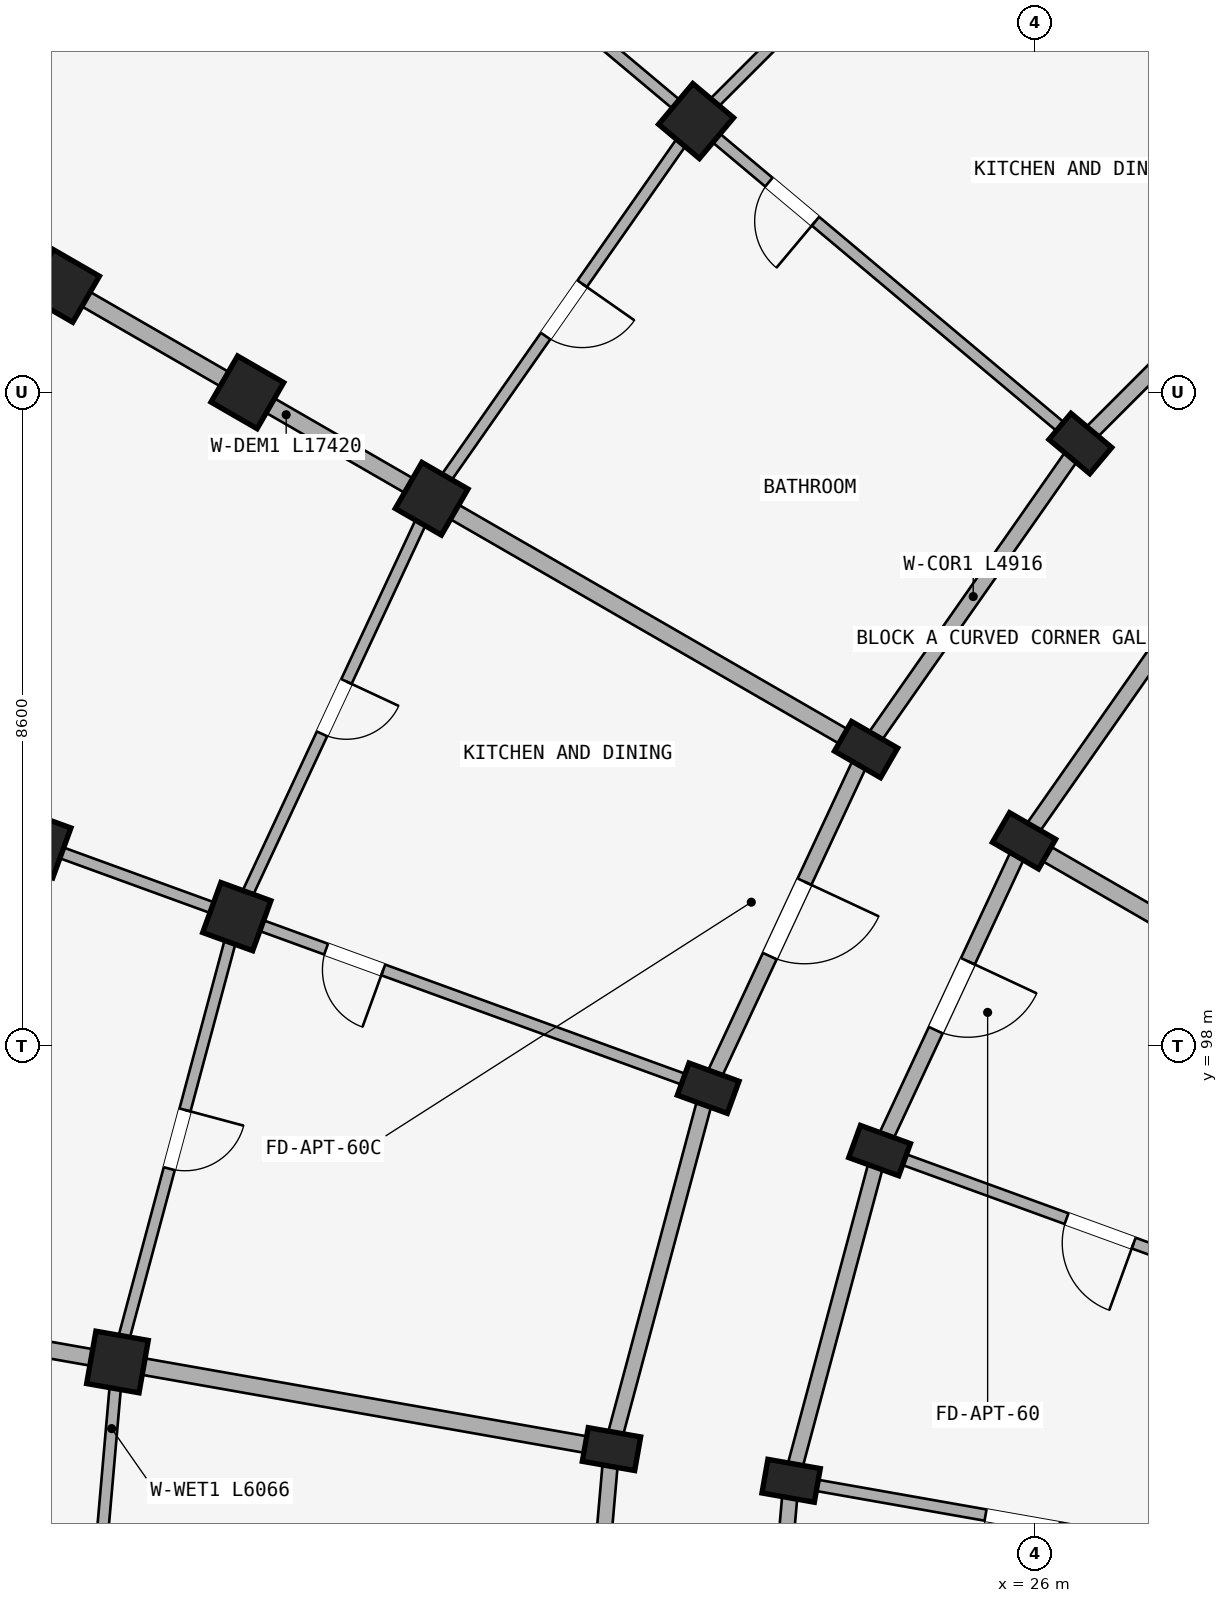
"""IFC4 building model, lengths in metres.
Left out: names, types, materials, properties, quantities, classifications, styles, units other than length and angle.
Written with IfcOpenShell. Run it as: python <this file> out.ifc"""

import sys

from ifc_helpers import new_model, si_unit, direction, frame, frame_2d, origin, origin_2d, place, context, subcontext, project, spatial, rectangle, extrude, element, fill, save


model = new_model("IFC4")
c1 = context("Model", 3, precision=1e-05, world=origin(), true_north=direction((0.0, 1.0)))
c2 = subcontext(c1, "Body", "Model", "MODEL_VIEW")
j1 = project(units=[si_unit("LENGTHUNIT", "METRE"), si_unit("PLANEANGLEUNIT", "RADIAN")], contexts=[c1])
p1 = place(None, origin())
s1 = spatial("IfcSite", under=j1, at=p1, CompositionType="ELEMENT")
p2 = place(p1, origin())
s2 = spatial("IfcBuilding", under=s1, at=p2, CompositionType="ELEMENT")
p3 = place(p2, frame((0.0, 0.0, 18.15)))
s3 = spatial("IfcBuildingStorey", under=s2, at=p3, CompositionType="ELEMENT", Elevation=18.15)
p4 = place(p3, frame((26.598, 105.927, 0.0), z_axis=(0.0, 0.0, 1.0), x_axis=(0.642787609687, 0.766044443119, 0.0)))
e1 = element("IfcColumn", 1, at=p4, inside=s3, PredefinedType="COLUMN", context=c2, shape_type="SweptSolid", body=[
    extrude(rectangle(XDim=0.45, YDim=0.7, at=origin_2d()), origin(), (0.0, 0.0, 1.0), 2.93),
])
p5 = place(p3, frame((21.542, 110.169, 0.0), z_axis=(0.0, 0.0, 1.0), x_axis=(0.642787609687, 0.766044443119, 0.0)))
e2 = element("IfcColumn", 2, at=p5, inside=s3, PredefinedType="COLUMN", context=c2, shape_type="SweptSolid", body=[
    extrude(rectangle(XDim=0.7, YDim=0.7, at=origin_2d()), origin(), (0.0, 0.0, 1.0), 2.93),
])
for number, where, z_axis, x_axis in (
    (3, (25.856, 100.7, 0.0), (0.0, 0.0, 1.0), (0.5, 0.866, 0.0)),
    (4, (23.778, 101.9, 0.0), (0.0, 0.0, 1.0), (0.5, 0.866, 0.0)),
):
    element("IfcColumn", number, at=place(p3, frame(where, z_axis=z_axis, x_axis=x_axis)), inside=s3, PredefinedType="COLUMN", context=c2, shape_type="SweptSolid", body=[
        extrude(rectangle(XDim=0.45, YDim=0.7, at=origin_2d()), origin(), (0.0, 0.0, 1.0), 2.93),
    ])
for number, where, z_axis, x_axis in (
    (5, (18.062, 105.2, 0.0), (0.0, 0.0, 1.0), (0.5, 0.866, 0.0)),
    (6, (15.637, 106.6, 0.0), (0.0, 0.0, 1.0), (0.5, 0.866, 0.0)),
    (7, (13.213, 108.0, 0.0), (0.0, 0.0, 1.0), (0.5, 0.866, 0.0)),
):
    element("IfcColumn", number, at=place(p3, frame(where, z_axis=z_axis, x_axis=x_axis)), inside=s3, PredefinedType="COLUMN", context=c2, shape_type="SweptSolid", body=[
        extrude(rectangle(XDim=0.7, YDim=0.7, at=origin_2d()), origin(), (0.0, 0.0, 1.0), 2.93),
    ])
for number, where, z_axis, x_axis in (
    (8, (23.956, 96.624, 0.0), (0.0, 0.0, 1.0), (0.342, 0.94, 0.0)),
    (9, (21.701, 97.445, 0.0), (0.0, 0.0, 1.0), (0.342, 0.94, 0.0)),
):
    element("IfcColumn", number, at=place(p3, frame(where, z_axis=z_axis, x_axis=x_axis)), inside=s3, PredefinedType="COLUMN", context=c2, shape_type="SweptSolid", body=[
        extrude(rectangle(XDim=0.45, YDim=0.7, at=origin_2d()), origin(), (0.0, 0.0, 1.0), 2.93),
    ])
for number, where, z_axis, x_axis in (
    (10, (15.499, 99.702, 0.0), (0.0, 0.0, 1.0), (0.342, 0.94, 0.0)),
    (11, (12.868, 100.66, 0.0), (0.0, 0.0, 1.0), (0.342, 0.94, 0.0)),
):
    element("IfcColumn", number, at=place(p3, frame(where, z_axis=z_axis, x_axis=x_axis)), inside=s3, PredefinedType="COLUMN", context=c2, shape_type="SweptSolid", body=[
        extrude(rectangle(XDim=0.7, YDim=0.7, at=origin_2d()), origin(), (0.0, 0.0, 1.0), 2.93),
    ])
for number, where, z_axis, x_axis in (
    (12, (22.792, 92.28, 0.0), (0.0, 0.0, 1.0), (0.174, 0.985, 0.0)),
    (13, (20.428, 92.697, 0.0), (0.0, 0.0, 1.0), (0.174, 0.985, 0.0)),
):
    element("IfcColumn", number, at=place(p3, frame(where, z_axis=z_axis, x_axis=x_axis)), inside=s3, PredefinedType="COLUMN", context=c2, shape_type="SweptSolid", body=[
        extrude(rectangle(XDim=0.45, YDim=0.7, at=origin_2d()), origin(), (0.0, 0.0, 1.0), 2.93),
    ])
p6 = place(p3, frame((13.929, 93.843, 0.0), z_axis=(0.0, 0.0, 1.0), x_axis=(0.173648177667, 0.984807753012, 0.0)))
e14 = element("IfcColumn", 14, at=p6, inside=s3, PredefinedType="COLUMN", context=c2, shape_type="SweptSolid", body=[
    extrude(rectangle(XDim=0.7, YDim=0.7, at=origin_2d()), origin(), (0.0, 0.0, 1.0), 2.93),
])
p7 = place(p3, frame((30.073, 109.402, 0.0), z_axis=(0.0, 0.0, 1.0), x_axis=(-0.707106781187, -0.707106781187, 0.0)))
e15 = element("IfcWall", 15, at=p7, inside=s3, PredefinedType="STANDARD", context=c2, shape_type="SweptSolid", body=[
    extrude(rectangle(XDim=4.916, YDim=0.2, at=frame_2d((2.458, 0.0))), origin(), (0.0, 0.0, 1.0), 2.372),
])
p8 = place(p3, frame((28.436, 104.384, 0.0), z_axis=(0.0, 0.0, 1.0), x_axis=(-0.573571637217, -0.819155404658, 0.0)))
e16 = element("IfcWall", 16, at=p8, inside=s3, PredefinedType="STANDARD", context=c2, shape_type="SweptSolid", body=[
    extrude(rectangle(XDim=4.497, YDim=0.2, at=frame_2d((2.249, 0.0))), origin(), (0.0, 0.0, 1.0), 2.372),
])
p9 = place(p3, frame((26.598, 105.927, 0.0), z_axis=(0.0, 0.0, 1.0), x_axis=(-0.573592335331, -0.819140911474, 0.0)))
e17 = element("IfcWall", 17, at=p9, inside=s3, PredefinedType="STANDARD", context=c2, shape_type="SweptSolid", body=[
    extrude(rectangle(XDim=4.916, YDim=0.2, at=frame_2d((2.458, 0.0))), origin(), (0.0, 0.0, 1.0), 2.372),
])
p10 = place(p3, frame((25.856, 100.7, 0.0), z_axis=(0.0, 0.0, 1.0), x_axis=(-0.422617978463, -0.906307919131, 0.0)))
e18 = element("IfcWall", 18, at=p10, inside=s3, PredefinedType="STANDARD", context=c2, shape_type="SweptSolid", body=[
    extrude(rectangle(XDim=4.497, YDim=0.2, at=frame_2d((2.249, 0.0))), origin(), (0.0, 0.0, 1.0), 2.372),
])
p11 = place(p10, frame((1.749, 0.0, 0.0)))
e19 = element("IfcOpeningElement", 19, at=p11, cuts=e18, PredefinedType="OPENING", context=c2, shape_type="SweptSolid", body=[
    extrude(rectangle(XDim=1.0, YDim=2.15, at=frame_2d((0.5, 1.075))), frame((0.0, 0.11, 0.0), z_axis=(0.0, -1.0, 0.0), x_axis=(1.0, 0.0, 0.0)), (0.0, 0.0, 1.0), 0.22),
])
p12 = place(p3, frame((23.778, 101.9, 0.0), z_axis=(0.0, 0.0, 1.0), x_axis=(-0.422629854778, -0.906302381024, 0.0)))
e20 = element("IfcWall", 20, at=p12, inside=s3, PredefinedType="STANDARD", context=c2, shape_type="SweptSolid", body=[
    extrude(rectangle(XDim=4.915, YDim=0.2, at=frame_2d((2.458, 0.0))), origin(), (0.0, 0.0, 1.0), 2.372),
])
p13 = place(p12, frame((1.918, 0.0, 0.0)))
e21 = element("IfcOpeningElement", 21, at=p13, cuts=e20, PredefinedType="OPENING", context=c2, shape_type="SweptSolid", body=[
    extrude(rectangle(XDim=1.08, YDim=2.15, at=frame_2d((0.54, 1.075))), frame((0.0, 0.11, 0.0), z_axis=(0.0, -1.0, 0.0), x_axis=(1.0, 0.0, 0.0)), (0.0, 0.0, 1.0), 0.22),
])
p14 = place(p3, frame((23.956, 96.624, 0.0), z_axis=(0.0, 0.0, 1.0), x_axis=(-0.258787642463, -0.965934240054, 0.0)))
e22 = element("IfcWall", 22, at=p14, inside=s3, PredefinedType="STANDARD", context=c2, shape_type="SweptSolid", body=[
    extrude(rectangle(XDim=4.497, YDim=0.2, at=frame_2d((2.249, 0.0))), origin(), (0.0, 0.0, 1.0), 2.372),
])
p15 = place(p3, frame((21.701, 97.445, 0.0), z_axis=(0.0, 0.0, 1.0), x_axis=(-0.258803112091, -0.965930095386, 0.0)))
e23 = element("IfcWall", 23, at=p15, inside=s3, PredefinedType="STANDARD", context=c2, shape_type="SweptSolid", body=[
    extrude(rectangle(XDim=4.916, YDim=0.2, at=frame_2d((2.458, 0.0))), origin(), (0.0, 0.0, 1.0), 2.372),
])
p16 = place(p3, frame((22.792, 92.28, 0.0), z_axis=(0.0, 0.0, 1.0), x_axis=(-0.087187153726, -0.996191949488, 0.0)))
e24 = element("IfcWall", 24, at=p16, inside=s3, PredefinedType="STANDARD", context=c2, shape_type="SweptSolid", body=[
    extrude(rectangle(XDim=4.497, YDim=0.2, at=frame_2d((2.249, 0.0))), origin(), (0.0, 0.0, 1.0), 2.372),
])
p17 = place(p3, frame((20.428, 92.697, 0.0), z_axis=(0.0, 0.0, 1.0), x_axis=(-0.087167566415, -0.996193663584, 0.0)))
e25 = element("IfcWall", 25, at=p17, inside=s3, PredefinedType="STANDARD", context=c2, shape_type="SweptSolid", body=[
    extrude(rectangle(XDim=4.916, YDim=0.2, at=frame_2d((2.458, 0.0))), origin(), (0.0, 0.0, 1.0), 2.372),
])
p18 = place(p17, frame((1.888, 0.0, 0.0)))
e26 = element("IfcOpeningElement", 26, at=p18, cuts=e25, PredefinedType="OPENING", context=c2, shape_type="SweptSolid", body=[
    extrude(rectangle(XDim=1.14, YDim=2.15, at=frame_2d((0.57, 1.075))), frame((0.0, 0.11, 0.0), z_axis=(0.0, -1.0, 0.0), x_axis=(1.0, 0.0, 0.0)), (0.0, 0.0, 1.0), 0.22),
])
p19 = place(p3, frame((30.009, 109.479, 0.0), z_axis=(0.0, 0.0, 1.0), x_axis=(-0.642784757967, 0.766046835987, 0.0)))
e27 = element("IfcWall", 27, at=p19, inside=s3, PredefinedType="PARTITIONING", context=c2, shape_type="SweptSolid", body=[
    extrude(rectangle(XDim=17.42, YDim=0.15, at=frame_2d((8.71, 0.0))), origin(), (0.0, 0.0, 1.0), 2.372),
])
p20 = place(p19, frame((4.45, 0.0, 0.0)))
e28 = element("IfcOpeningElement", 28, at=p20, cuts=e27, PredefinedType="OPENING", context=c2, shape_type="SweptSolid", body=[
    extrude(rectangle(XDim=0.8, YDim=2.1, at=frame_2d((0.4, 1.05))), frame((0.0, 0.085, 0.0), z_axis=(0.0, -1.0, 0.0), x_axis=(1.0, 0.0, 0.0)), (0.0, 0.0, 1.0), 0.17),
])
p21 = place(p3, frame((26.521, 105.991, 0.0), z_axis=(0.0, 0.0, 1.0), x_axis=(-0.766046835987, 0.642784757967, 0.0)))
e29 = element("IfcWall", 29, at=p21, inside=s3, PredefinedType="PARTITIONING", context=c2, shape_type="SweptSolid", body=[
    extrude(rectangle(XDim=17.42, YDim=0.15, at=frame_2d((8.71, 0.0))), origin(), (0.0, 0.0, 1.0), 2.372),
])
p22 = place(p21, frame((4.45, 0.0, 0.0)))
e30 = element("IfcOpeningElement", 30, at=p22, cuts=e29, PredefinedType="OPENING", context=c2, shape_type="SweptSolid", body=[
    extrude(rectangle(XDim=0.8, YDim=2.1, at=frame_2d((0.4, 1.05))), frame((0.0, 0.085, 0.0), z_axis=(0.0, -1.0, 0.0), x_axis=(1.0, 0.0, 0.0)), (0.0, 0.0, 1.0), 0.17),
])
p23 = place(p3, frame((31.746, 97.3, 0.0), z_axis=(0.0, 0.0, 1.0), x_axis=(-0.866026575979, 0.499997969693, 0.0)))
e31 = element("IfcWall", 31, at=p23, inside=s3, PredefinedType="STANDARD", context=c2, shape_type="SweptSolid", body=[
    extrude(rectangle(XDim=6.75, YDim=0.22, at=frame_2d((3.375, 0.0))), origin(), (0.0, 0.0, 1.0), 2.372),
])
p24 = place(p3, frame((23.691, 101.95, 0.0), z_axis=(0.0, 0.0, 1.0), x_axis=(-0.866026648973, 0.499997843263, 0.0)))
e32 = element("IfcWall", 32, at=p24, inside=s3, PredefinedType="STANDARD", context=c2, shape_type="SweptSolid", body=[
    extrude(rectangle(XDim=17.42, YDim=0.22, at=frame_2d((8.71, 0.0))), origin(), (0.0, 0.0, 1.0), 2.372),
])
p25 = place(p3, frame((30.346, 94.298, 0.0), z_axis=(0.0, 0.0, 1.0), x_axis=(-0.939696231917, 0.342010221662, 0.0)))
e33 = element("IfcWall", 33, at=p25, inside=s3, PredefinedType="PARTITIONING", context=c2, shape_type="SweptSolid", body=[
    extrude(rectangle(XDim=6.75, YDim=0.15, at=frame_2d((3.375, 0.0))), origin(), (0.0, 0.0, 1.0), 2.372),
])
p26 = place(p25, frame((3.242, 0.0, 0.0)))
e34 = element("IfcOpeningElement", 34, at=p26, cuts=e33, PredefinedType="OPENING", context=c2, shape_type="SweptSolid", body=[
    extrude(rectangle(XDim=0.94, YDim=2.1, at=frame_2d((0.47, 1.05))), frame((0.0, 0.085, 0.0), z_axis=(0.0, -1.0, 0.0), x_axis=(1.0, 0.0, 0.0)), (0.0, 0.0, 1.0), 0.17),
])
p27 = place(p3, frame((21.607, 97.479, 0.0), z_axis=(0.0, 0.0, 1.0), x_axis=(-0.939691901159, 0.342022120477, 0.0)))
e35 = element("IfcWall", 35, at=p27, inside=s3, PredefinedType="PARTITIONING", context=c2, shape_type="SweptSolid", body=[
    extrude(rectangle(XDim=17.42, YDim=0.15, at=frame_2d((8.71, 0.0))), origin(), (0.0, 0.0, 1.0), 2.372),
])
p28 = place(p27, frame((4.45, 0.0, 0.0)))
e36 = element("IfcOpeningElement", 36, at=p28, cuts=e35, PredefinedType="OPENING", context=c2, shape_type="SweptSolid", body=[
    extrude(rectangle(XDim=0.8, YDim=2.1, at=frame_2d((0.4, 1.05))), frame((0.0, 0.085, 0.0), z_axis=(0.0, -1.0, 0.0), x_axis=(1.0, 0.0, 0.0)), (0.0, 0.0, 1.0), 0.17),
])
p29 = place(p3, frame((29.489, 91.099, 0.0), z_axis=(0.0, 0.0, 1.0), x_axis=(-0.984807944945, 0.173647089161, 0.0)))
e37 = element("IfcWall", 37, at=p29, inside=s3, PredefinedType="PARTITIONING", context=c2, shape_type="SweptSolid", body=[
    extrude(rectangle(XDim=6.75, YDim=0.15, at=frame_2d((3.375, 0.0))), origin(), (0.0, 0.0, 1.0), 2.372),
])
p30 = place(p29, frame((3.222, 0.0, 0.0)))
e38 = element("IfcOpeningElement", 38, at=p30, cuts=e37, PredefinedType="OPENING", context=c2, shape_type="SweptSolid", body=[
    extrude(rectangle(XDim=0.98, YDim=2.12, at=frame_2d((0.49, 1.06))), frame((0.0, 0.085, 0.0), z_axis=(0.0, -1.0, 0.0), x_axis=(1.0, 0.0, 0.0)), (0.0, 0.0, 1.0), 0.17),
])
p31 = place(p3, frame((20.33, 92.714, 0.0), z_axis=(0.0, 0.0, 1.0), x_axis=(-0.984808098809, 0.173646216546, 0.0)))
e39 = element("IfcWall", 39, at=p31, inside=s3, PredefinedType="STANDARD", context=c2, shape_type="SweptSolid", body=[
    extrude(rectangle(XDim=17.42, YDim=0.22, at=frame_2d((8.71, 0.0))), origin(), (0.0, 0.0, 1.0), 2.372),
])
p32 = place(p3, frame((25.831, 114.458, 0.0), z_axis=(0.0, 0.0, 1.0), x_axis=(-0.707106781187, -0.707106781187, 0.0)))
e40 = element("IfcWall", 40, at=p32, inside=s3, PredefinedType="PLUMBINGWALL", context=c2, shape_type="SweptSolid", body=[
    extrude(rectangle(XDim=6.066, YDim=0.15, at=frame_2d((3.033, 0.0))), origin(), (0.0, 0.0, 1.0), 2.372),
])
p33 = place(p32, frame((2.633, 0.0, 0.0)))
e41 = element("IfcOpeningElement", 41, at=p33, cuts=e40, PredefinedType="OPENING", context=c2, shape_type="SweptSolid", body=[
    extrude(rectangle(XDim=0.8, YDim=2.1, at=frame_2d((0.4, 1.05))), frame((0.0, 0.085, 0.0), z_axis=(0.0, -1.0, 0.0), x_axis=(1.0, 0.0, 0.0)), (0.0, 0.0, 1.0), 0.17),
])
p34 = place(p3, frame((21.542, 110.169, 0.0), z_axis=(0.0, 0.0, 1.0), x_axis=(-0.573594691504, -0.81913926159, 0.0)))
e42 = element("IfcWall", 42, at=p34, inside=s3, PredefinedType="PLUMBINGWALL", context=c2, shape_type="SweptSolid", body=[
    extrude(rectangle(XDim=6.066, YDim=0.15, at=frame_2d((3.033, 0.0))), origin(), (0.0, 0.0, 1.0), 2.372),
])
p35 = place(p34, frame((2.613, 0.0, 0.0)))
e43 = element("IfcOpeningElement", 43, at=p35, cuts=e42, PredefinedType="OPENING", context=c2, shape_type="SweptSolid", body=[
    extrude(rectangle(XDim=0.84, YDim=2.1, at=frame_2d((0.42, 1.05))), frame((0.0, 0.085, 0.0), z_axis=(0.0, -1.0, 0.0), x_axis=(1.0, 0.0, 0.0)), (0.0, 0.0, 1.0), 0.17),
])
p36 = place(p3, frame((18.062, 105.2, 0.0), z_axis=(0.0, 0.0, 1.0), x_axis=(-0.42260781991, -0.906312656069, 0.0)))
e44 = element("IfcWall", 44, at=p36, inside=s3, PredefinedType="PLUMBINGWALL", context=c2, shape_type="SweptSolid", body=[
    extrude(rectangle(XDim=6.066, YDim=0.15, at=frame_2d((3.033, 0.0))), origin(), (0.0, 0.0, 1.0), 2.372),
])
p37 = place(p36, frame((2.653, 0.0, 0.0)))
e45 = element("IfcOpeningElement", 45, at=p37, cuts=e44, PredefinedType="OPENING", context=c2, shape_type="SweptSolid", body=[
    extrude(rectangle(XDim=0.76, YDim=2.05, at=frame_2d((0.38, 1.025))), frame((0.0, 0.085, 0.0), z_axis=(0.0, -1.0, 0.0), x_axis=(1.0, 0.0, 0.0)), (0.0, 0.0, 1.0), 0.17),
])
p38 = place(p3, frame((15.499, 99.702, 0.0), z_axis=(0.0, 0.0, 1.0), x_axis=(-0.258827283048, -0.965923618901, 0.0)))
e46 = element("IfcWall", 46, at=p38, inside=s3, PredefinedType="PLUMBINGWALL", context=c2, shape_type="SweptSolid", body=[
    extrude(rectangle(XDim=6.066, YDim=0.15, at=frame_2d((3.033, 0.0))), origin(), (0.0, 0.0, 1.0), 2.372),
])
p39 = place(p38, frame((2.633, 0.0, 0.0)))
e47 = element("IfcOpeningElement", 47, at=p39, cuts=e46, PredefinedType="OPENING", context=c2, shape_type="SweptSolid", body=[
    extrude(rectangle(XDim=0.8, YDim=2.1, at=frame_2d((0.4, 1.05))), frame((0.0, 0.085, 0.0), z_axis=(0.0, -1.0, 0.0), x_axis=(1.0, 0.0, 0.0)), (0.0, 0.0, 1.0), 0.17),
])
p40 = place(p3, frame((13.929, 93.843, 0.0), z_axis=(0.0, 0.0, 1.0), x_axis=(-0.087174938512, -0.996193018494, 0.0)))
e48 = element("IfcWall", 48, at=p40, inside=s3, PredefinedType="PLUMBINGWALL", context=c2, shape_type="SweptSolid", body=[
    extrude(rectangle(XDim=6.066, YDim=0.15, at=frame_2d((3.033, 0.0))), origin(), (0.0, 0.0, 1.0), 2.372),
])
p41 = place(p40, frame((2.613, 0.0, 0.0)))
e49 = element("IfcOpeningElement", 49, at=p41, cuts=e48, PredefinedType="OPENING", context=c2, shape_type="SweptSolid", body=[
    extrude(rectangle(XDim=0.84, YDim=2.1, at=frame_2d((0.42, 1.05))), frame((0.0, 0.085, 0.0), z_axis=(0.0, -1.0, 0.0), x_axis=(1.0, 0.0, 0.0)), (0.0, 0.0, 1.0), 0.17),
])
p42 = place(p22, frame((0.8, 0.0, 0.0), z_axis=(0.0, 0.0, 1.0), x_axis=(-1.0, 0.0, 0.0)))
e50 = element("IfcDoor", 50, at=p42, inside=s3, OperationType="SINGLE_SWING_RIGHT", PredefinedType="DOOR", context=c2, shape_type="SweptSolid", body=[
    extrude(rectangle(XDim=0.8, YDim=2.1, at=frame_2d((0.4, 1.05))), frame((0.0, 0.025, 0.0), z_axis=(0.0, -1.0, 0.0), x_axis=(1.0, 0.0, 0.0)), (0.0, 0.0, 1.0), 0.05),
])
fill(e30, e50)
p43 = place(p26, origin())
e51 = element("IfcDoor", 51, at=p43, inside=s3, OperationType="SINGLE_SWING_LEFT", PredefinedType="DOOR", context=c2, shape_type="SweptSolid", body=[
    extrude(rectangle(XDim=0.94, YDim=2.1, at=frame_2d((0.47, 1.05))), frame((0.0, 0.025, 0.0), z_axis=(0.0, -1.0, 0.0), x_axis=(1.0, 0.0, 0.0)), (0.0, 0.0, 1.0), 0.05),
])
fill(e34, e51)
p44 = place(p28, frame((0.8, 0.0, 0.0), z_axis=(0.0, 0.0, 1.0), x_axis=(-1.0, 0.0, 0.0)))
e52 = element("IfcDoor", 52, at=p44, inside=s3, OperationType="SINGLE_SWING_RIGHT", PredefinedType="DOOR", context=c2, shape_type="SweptSolid", body=[
    extrude(rectangle(XDim=0.8, YDim=2.1, at=frame_2d((0.4, 1.05))), frame((0.0, 0.025, 0.0), z_axis=(0.0, -1.0, 0.0), x_axis=(1.0, 0.0, 0.0)), (0.0, 0.0, 1.0), 0.05),
])
fill(e36, e52)
p45 = place(p30, origin())
e53 = element("IfcDoor", 53, at=p45, inside=s3, OperationType="SINGLE_SWING_LEFT", PredefinedType="DOOR", context=c2, shape_type="SweptSolid", body=[
    extrude(rectangle(XDim=0.98, YDim=2.12, at=frame_2d((0.49, 1.06))), frame((0.0, 0.025, 0.0), z_axis=(0.0, -1.0, 0.0), x_axis=(1.0, 0.0, 0.0)), (0.0, 0.0, 1.0), 0.05),
])
fill(e38, e53)
p46 = place(p35, frame((0.84, 0.0, 0.0), z_axis=(0.0, 0.0, 1.0), x_axis=(-1.0, 0.0, 0.0)))
e54 = element("IfcDoor", 54, at=p46, inside=s3, OperationType="SINGLE_SWING_RIGHT", PredefinedType="DOOR", context=c2, shape_type="SweptSolid", body=[
    extrude(rectangle(XDim=0.84, YDim=2.1, at=frame_2d((0.42, 1.05))), frame((0.0, 0.025, 0.0), z_axis=(0.0, -1.0, 0.0), x_axis=(1.0, 0.0, 0.0)), (0.0, 0.0, 1.0), 0.05),
])
fill(e43, e54)
p47 = place(p13, origin())
e55 = element("IfcDoor", 55, at=p47, inside=s3, OperationType="SINGLE_SWING_LEFT", PredefinedType="DOOR", context=c2, shape_type="SweptSolid", body=[
    extrude(rectangle(XDim=1.08, YDim=2.15, at=frame_2d((0.54, 1.075))), frame((0.0, 0.025, 0.0), z_axis=(0.0, -1.0, 0.0), x_axis=(1.0, 0.0, 0.0)), (0.0, 0.0, 1.0), 0.05),
])
fill(e21, e55)
p48 = place(p37, frame((0.76, 0.0, 0.0), z_axis=(0.0, 0.0, 1.0), x_axis=(-1.0, 0.0, 0.0)))
e56 = element("IfcDoor", 56, at=p48, inside=s3, OperationType="SINGLE_SWING_RIGHT", PredefinedType="DOOR", context=c2, shape_type="SweptSolid", body=[
    extrude(rectangle(XDim=0.76, YDim=2.05, at=frame_2d((0.38, 1.025))), frame((0.0, 0.025, 0.0), z_axis=(0.0, -1.0, 0.0), x_axis=(1.0, 0.0, 0.0)), (0.0, 0.0, 1.0), 0.05),
])
fill(e45, e56)
p49 = place(p39, origin())
e57 = element("IfcDoor", 57, at=p49, inside=s3, OperationType="SINGLE_SWING_LEFT", PredefinedType="DOOR", context=c2, shape_type="SweptSolid", body=[
    extrude(rectangle(XDim=0.8, YDim=2.1, at=frame_2d((0.4, 1.05))), frame((0.0, 0.025, 0.0), z_axis=(0.0, -1.0, 0.0), x_axis=(1.0, 0.0, 0.0)), (0.0, 0.0, 1.0), 0.05),
])
fill(e47, e57)
p50 = place(p11, frame((1.0, 0.0, 0.0), z_axis=(0.0, 0.0, 1.0), x_axis=(-1.0, 0.0, 0.0)))
e58 = element("IfcDoor", 58, at=p50, inside=s3, OperationType="SINGLE_SWING_RIGHT", PredefinedType="DOOR", context=c2, shape_type="SweptSolid", body=[
    extrude(rectangle(XDim=1.0, YDim=2.15, at=frame_2d((0.5, 1.075))), frame((0.0, 0.025, 0.0), z_axis=(0.0, -1.0, 0.0), x_axis=(1.0, 0.0, 0.0)), (0.0, 0.0, 1.0), 0.05),
])
fill(e19, e58)
save(model, sys.argv[1])
